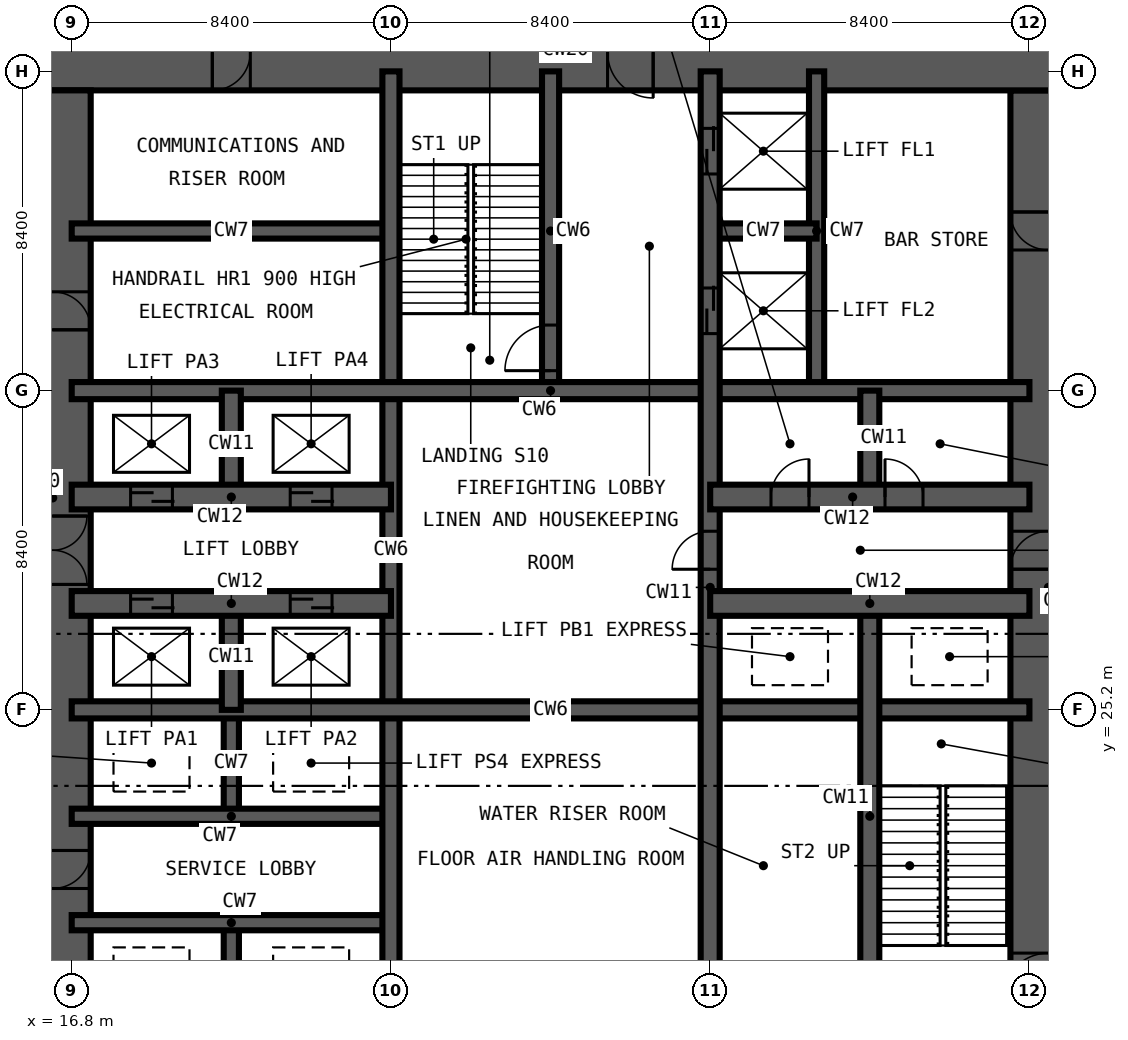
"""IFC4 building model, lengths in metres.
Left out: names, types, materials, properties, quantities, classifications, styles, units other than length and angle.
Written with IfcOpenShell. Run it as: python <this file> out.ifc"""

import sys

from ifc_helpers import new_model, si_unit, direction, frame, frame_2d, origin, place, context, subcontext, project, spatial, rectangle, extrude, element, fill, save


model = new_model("IFC4")
c1 = context("Model", 3, precision=1e-05, world=origin(), true_north=direction((0.0, 1.0)))
c2 = subcontext(c1, "Body", "Model", "MODEL_VIEW")
j1 = project(units=[si_unit("LENGTHUNIT", "METRE"), si_unit("PLANEANGLEUNIT", "RADIAN")], contexts=[c1])
p1 = place(None, origin())
s1 = spatial("IfcSite", under=j1, at=p1, CompositionType="ELEMENT")
p2 = place(p1, origin())
s2 = spatial("IfcBuilding", under=s1, at=p2, CompositionType="ELEMENT")
p3 = place(p2, frame((0.0, 0.0, 17.0)))
s3 = spatial("IfcBuildingStorey", under=s2, at=p3, CompositionType="ELEMENT", Elevation=17.0)
p4 = place(p3, frame((42.5, 17.3, -0.3), z_axis=(0.0, 0.0, 1.0), x_axis=(0.0, 1.0, 0.0)))
e1 = element("IfcWall", 1, at=p4, inside=s3, PredefinedType="SHEAR", context=c2, shape_type="SweptSolid", body=[
    extrude(rectangle(XDim=24.2, YDim=2.0, at=frame_2d((12.1, 0.0))), origin(), (0.0, 0.0, 1.0), 4.95),
])
p5 = place(p4, frame((0.3, 0.0, 0.3)))
e2 = element("IfcOpeningElement", 2, at=p5, cuts=e1, PredefinedType="OPENING", context=c2, shape_type="SweptSolid", body=[
    extrude(rectangle(XDim=1.2, YDim=2.2, at=frame_2d((0.6, 1.1))), frame((0.0, 1.01, 0.0), z_axis=(0.0, -1.0, 0.0), x_axis=(1.0, 0.0, 0.0)), (0.0, 0.0, 1.0), 2.02),
])
p6 = place(p4, frame((11.6, 0.0, 0.3)))
e3 = element("IfcOpeningElement", 3, at=p6, cuts=e1, PredefinedType="OPENING", context=c2, shape_type="SweptSolid", body=[
    extrude(rectangle(XDim=1.0, YDim=2.1, at=frame_2d((0.5, 1.05))), frame((0.0, 1.01, 0.0), z_axis=(0.0, -1.0, 0.0), x_axis=(1.0, 0.0, 0.0)), (0.0, 0.0, 1.0), 2.02),
])
p7 = place(p4, frame((20.0, 0.0, 0.3)))
e4 = element("IfcOpeningElement", 4, at=p7, cuts=e1, PredefinedType="OPENING", context=c2, shape_type="SweptSolid", body=[
    extrude(rectangle(XDim=1.0, YDim=2.1, at=frame_2d((0.5, 1.05))), frame((0.0, 1.01, 0.0), z_axis=(0.0, -1.0, 0.0), x_axis=(1.0, 0.0, 0.0)), (0.0, 0.0, 1.0), 2.02),
])
p8 = place(p3, frame((43.5, 42.5, -0.3), z_axis=(0.0, 0.0, 1.0), x_axis=(-1.0, 0.0, 0.0)))
e5 = element("IfcWall", 5, at=p8, inside=s3, PredefinedType="SHEAR", context=c2, shape_type="SweptSolid", body=[
    extrude(rectangle(XDim=28.2, YDim=2.0, at=frame_2d((14.1, 0.0))), origin(), (0.0, 0.0, 1.0), 4.95),
])
p9 = place(p8, frame((22.0, 0.0, 0.3)))
e6 = element("IfcOpeningElement", 6, at=p9, cuts=e5, PredefinedType="OPENING", context=c2, shape_type="SweptSolid", body=[
    extrude(rectangle(XDim=1.0, YDim=2.1, at=frame_2d((0.5, 1.05))), frame((0.0, 1.01, 0.0), z_axis=(0.0, -1.0, 0.0), x_axis=(1.0, 0.0, 0.0)), (0.0, 0.0, 1.0), 2.02),
])
p10 = place(p8, frame((11.4, 0.0, 0.3)))
e7 = element("IfcOpeningElement", 7, at=p10, cuts=e5, PredefinedType="OPENING", context=c2, shape_type="SweptSolid", body=[
    extrude(rectangle(XDim=1.2, YDim=2.2, at=frame_2d((0.6, 1.1))), frame((0.0, 1.01, 0.0), z_axis=(0.0, -1.0, 0.0), x_axis=(1.0, 0.0, 0.0)), (0.0, 0.0, 1.0), 2.02),
])
p11 = place(p3, frame((16.3, 41.5, -0.3), z_axis=(0.0, 0.0, 1.0), x_axis=(0.0, -1.0, 0.0)))
e8 = element("IfcWall", 8, at=p11, inside=s3, PredefinedType="SHEAR", context=c2, shape_type="SweptSolid", body=[
    extrude(rectangle(XDim=24.2, YDim=2.0, at=frame_2d((12.1, 0.0))), origin(), (0.0, 0.0, 1.0), 4.95),
])
p12 = place(p11, frame((11.2, 0.0, 0.3)))
e9 = element("IfcOpeningElement", 9, at=p12, cuts=e8, PredefinedType="OPENING", context=c2, shape_type="SweptSolid", body=[
    extrude(rectangle(XDim=1.8, YDim=2.2, at=frame_2d((0.9, 1.1))), frame((0.0, 1.01, 0.0), z_axis=(0.0, -1.0, 0.0), x_axis=(1.0, 0.0, 0.0)), (0.0, 0.0, 1.0), 2.02),
])
p13 = place(p11, frame((20.0, 0.0, 0.3)))
e10 = element("IfcOpeningElement", 10, at=p13, cuts=e8, PredefinedType="OPENING", context=c2, shape_type="SweptSolid", body=[
    extrude(rectangle(XDim=1.0, YDim=2.1, at=frame_2d((0.5, 1.05))), frame((0.0, 1.01, 0.0), z_axis=(0.0, -1.0, 0.0), x_axis=(1.0, 0.0, 0.0)), (0.0, 0.0, 1.0), 2.02),
])
p14 = place(p11, frame((5.3, 0.0, 0.3)))
e11 = element("IfcOpeningElement", 11, at=p14, cuts=e8, PredefinedType="OPENING", context=c2, shape_type="SweptSolid", body=[
    extrude(rectangle(XDim=1.0, YDim=2.1, at=frame_2d((0.5, 1.05))), frame((0.0, 1.01, 0.0), z_axis=(0.0, -1.0, 0.0), x_axis=(1.0, 0.0, 0.0)), (0.0, 0.0, 1.0), 2.02),
])
for number, where, z_axis, x_axis in (
    (12, (21.0, 16.8, -0.3), (0.0, 0.0, 1.0), (0.0, 1.0, 0.0)),
    (13, (21.0, 22.4, -0.3), (0.0, 0.0, 1.0), (0.0, 1.0, 0.0)),
):
    element("IfcWall", number, at=place(p3, frame(where, z_axis=z_axis, x_axis=x_axis)), inside=s3, PredefinedType="SHEAR", context=c2, shape_type="SweptSolid", body=[
        extrude(rectangle(XDim=2.8, YDim=0.4, at=frame_2d((1.4, 0.0))), origin(), (0.0, 0.0, 1.0), 4.95),
    ])
for number, where, z_axis, x_axis in (
    (14, (36.4, 33.6, -0.3), (0.0, 0.0, 1.0), (0.0, 1.0, 0.0)),
    (15, (16.8, 19.6, -0.3), (0.0, 0.0, 1.0), (1.0, 0.0, 0.0)),
    (16, (16.8, 22.4, -0.3), (0.0, 0.0, 1.0), (1.0, 0.0, 0.0)),
    (17, (16.8, 37.8, -0.3), (0.0, 0.0, 1.0), (1.0, 0.0, 0.0)),
):
    element("IfcWall", number, at=place(p3, frame(where, z_axis=z_axis, x_axis=x_axis)), inside=s3, PredefinedType="SHEAR", context=c2, shape_type="SweptSolid", body=[
        extrude(rectangle(XDim=8.4, YDim=0.4, at=frame_2d((4.2, 0.0))), origin(), (0.0, 0.0, 1.0), 4.95),
    ])
p15 = place(p3, frame((33.6, 37.8, -0.3), z_axis=(0.0, 0.0, 1.0), x_axis=(1.0, 0.0, 0.0)))
e18 = element("IfcWall", 18, at=p15, inside=s3, PredefinedType="SHEAR", context=c2, shape_type="SweptSolid", body=[
    extrude(rectangle(XDim=2.8, YDim=0.4, at=frame_2d((1.4, 0.0))), origin(), (0.0, 0.0, 1.0), 4.95),
])
p16 = place(p3, frame((25.2, 16.8, -0.3), z_axis=(0.0, 0.0, 1.0), x_axis=(0.0, 1.0, 0.0)))
e19 = element("IfcWall", 19, at=p16, inside=s3, PredefinedType="SHEAR", context=c2, shape_type="SweptSolid", body=[
    extrude(rectangle(XDim=25.2, YDim=0.45, at=frame_2d((12.6, 0.0))), origin(), (0.0, 0.0, 1.0), 4.95),
])
p17 = place(p3, frame((29.4, 33.6, -0.3), z_axis=(0.0, 0.0, 1.0), x_axis=(0.0, 1.0, 0.0)))
e20 = element("IfcWall", 20, at=p17, inside=s3, PredefinedType="SHEAR", context=c2, shape_type="SweptSolid", body=[
    extrude(rectangle(XDim=8.4, YDim=0.45, at=frame_2d((4.2, 0.0))), origin(), (0.0, 0.0, 1.0), 4.95),
])
p18 = place(p17, frame((0.525, 0.0, 0.3)))
e21 = element("IfcOpeningElement", 21, at=p18, cuts=e20, PredefinedType="OPENING", context=c2, shape_type="SweptSolid", body=[
    extrude(rectangle(XDim=1.2, YDim=2.2, at=frame_2d((0.6, 1.1))), frame((0.0, 0.235, 0.0), z_axis=(0.0, -1.0, 0.0), x_axis=(1.0, 0.0, 0.0)), (0.0, 0.0, 1.0), 0.47),
])
for number, where, z_axis, x_axis in (
    (22, (16.8, 25.2, -0.3), (0.0, 0.0, 1.0), (1.0, 0.0, 0.0)),
    (23, (16.8, 33.6, -0.3), (0.0, 0.0, 1.0), (1.0, 0.0, 0.0)),
):
    element("IfcWall", number, at=place(p3, frame(where, z_axis=z_axis, x_axis=x_axis)), inside=s3, PredefinedType="SHEAR", context=c2, shape_type="SweptSolid", body=[
        extrude(rectangle(XDim=25.2, YDim=0.45, at=frame_2d((12.6, 0.0))), origin(), (0.0, 0.0, 1.0), 4.95),
    ])
for number, where, z_axis, x_axis in (
    (24, (21.0, 25.2, -0.3), (0.0, 0.0, 1.0), (0.0, 1.0, 0.0)),
    (25, (21.0, 30.8, -0.3), (0.0, 0.0, 1.0), (0.0, 1.0, 0.0)),
):
    element("IfcWall", number, at=place(p3, frame(where, z_axis=z_axis, x_axis=x_axis)), inside=s3, PredefinedType="SHEAR", context=c2, shape_type="SweptSolid", body=[
        extrude(rectangle(XDim=2.8, YDim=0.5, at=frame_2d((1.4, 0.0))), origin(), (0.0, 0.0, 1.0), 4.95),
    ])
p19 = place(p3, frame((33.6, 16.8, -0.3), z_axis=(0.0, 0.0, 1.0), x_axis=(0.0, 1.0, 0.0)))
e26 = element("IfcWall", 26, at=p19, inside=s3, PredefinedType="SHEAR", context=c2, shape_type="SweptSolid", body=[
    extrude(rectangle(XDim=25.2, YDim=0.5, at=frame_2d((12.6, 0.0))), origin(), (0.0, 0.0, 1.0), 4.95),
])
p20 = place(p19, frame((22.5, 0.0, 0.3)))
e27 = element("IfcOpeningElement", 27, at=p20, cuts=e26, PredefinedType="OPENING", context=c2, shape_type="SweptSolid", body=[
    extrude(rectangle(XDim=1.2, YDim=2.2, at=frame_2d((0.6, 1.1))), frame((0.0, 0.26, 0.0), z_axis=(0.0, -1.0, 0.0), x_axis=(1.0, 0.0, 0.0)), (0.0, 0.0, 1.0), 0.52),
])
p21 = place(p19, frame((18.3, 0.0, 0.3)))
e28 = element("IfcOpeningElement", 28, at=p21, cuts=e26, PredefinedType="OPENING", context=c2, shape_type="SweptSolid", body=[
    extrude(rectangle(XDim=1.2, YDim=2.2, at=frame_2d((0.6, 1.1))), frame((0.0, 0.26, 0.0), z_axis=(0.0, -1.0, 0.0), x_axis=(1.0, 0.0, 0.0)), (0.0, 0.0, 1.0), 0.52),
])
p22 = place(p19, frame((12.1, 0.0, 0.3)))
e29 = element("IfcOpeningElement", 29, at=p22, cuts=e26, PredefinedType="OPENING", context=c2, shape_type="SweptSolid", body=[
    extrude(rectangle(XDim=1.0, YDim=2.1, at=frame_2d((0.5, 1.05))), frame((0.0, 0.26, 0.0), z_axis=(0.0, -1.0, 0.0), x_axis=(1.0, 0.0, 0.0)), (0.0, 0.0, 1.0), 0.52),
])
p23 = place(p3, frame((37.8, 16.8, -0.3), z_axis=(0.0, 0.0, 1.0), x_axis=(0.0, 1.0, 0.0)))
e30 = element("IfcWall", 30, at=p23, inside=s3, PredefinedType="SHEAR", context=c2, shape_type="SweptSolid", body=[
    extrude(rectangle(XDim=11.2, YDim=0.5, at=frame_2d((5.6, 0.0))), origin(), (0.0, 0.0, 1.0), 4.95),
])
p24 = place(p3, frame((37.8, 30.8, -0.3), z_axis=(0.0, 0.0, 1.0), x_axis=(0.0, 1.0, 0.0)))
e31 = element("IfcWall", 31, at=p24, inside=s3, PredefinedType="SHEAR", context=c2, shape_type="SweptSolid", body=[
    extrude(rectangle(XDim=2.8, YDim=0.5, at=frame_2d((1.4, 0.0))), origin(), (0.0, 0.0, 1.0), 4.95),
])
p25 = place(p3, frame((16.8, 28.0, -0.3), z_axis=(0.0, 0.0, 1.0), x_axis=(1.0, 0.0, 0.0)))
e32 = element("IfcWall", 32, at=p25, inside=s3, PredefinedType="SHEAR", context=c2, shape_type="SweptSolid", body=[
    extrude(rectangle(XDim=8.4, YDim=0.65, at=frame_2d((4.2, 0.0))), origin(), (0.0, 0.0, 1.0), 4.95),
])
p26 = place(p25, frame((1.55, 0.0, 0.3)))
e33 = element("IfcOpeningElement", 33, at=p26, cuts=e32, PredefinedType="OPENING", context=c2, shape_type="SweptSolid", body=[
    extrude(rectangle(XDim=1.1, YDim=2.2, at=frame_2d((0.55, 1.1))), frame((0.0, 0.335, 0.0), z_axis=(0.0, -1.0, 0.0), x_axis=(1.0, 0.0, 0.0)), (0.0, 0.0, 1.0), 0.67),
])
p27 = place(p25, frame((5.75, 0.0, 0.3)))
e34 = element("IfcOpeningElement", 34, at=p27, cuts=e32, PredefinedType="OPENING", context=c2, shape_type="SweptSolid", body=[
    extrude(rectangle(XDim=1.1, YDim=2.2, at=frame_2d((0.55, 1.1))), frame((0.0, 0.335, 0.0), z_axis=(0.0, -1.0, 0.0), x_axis=(1.0, 0.0, 0.0)), (0.0, 0.0, 1.0), 0.67),
])
p28 = place(p3, frame((33.6, 28.0, -0.3), z_axis=(0.0, 0.0, 1.0), x_axis=(1.0, 0.0, 0.0)))
e35 = element("IfcWall", 35, at=p28, inside=s3, PredefinedType="SHEAR", context=c2, shape_type="SweptSolid", body=[
    extrude(rectangle(XDim=8.4, YDim=0.65, at=frame_2d((4.2, 0.0))), origin(), (0.0, 0.0, 1.0), 4.95),
])
p29 = place(p3, frame((16.8, 30.8, -0.3), z_axis=(0.0, 0.0, 1.0), x_axis=(1.0, 0.0, 0.0)))
e36 = element("IfcWall", 36, at=p29, inside=s3, PredefinedType="SHEAR", context=c2, shape_type="SweptSolid", body=[
    extrude(rectangle(XDim=8.4, YDim=0.65, at=frame_2d((4.2, 0.0))), origin(), (0.0, 0.0, 1.0), 4.95),
])
p30 = place(p29, frame((1.55, 0.0, 0.3)))
e37 = element("IfcOpeningElement", 37, at=p30, cuts=e36, PredefinedType="OPENING", context=c2, shape_type="SweptSolid", body=[
    extrude(rectangle(XDim=1.1, YDim=2.2, at=frame_2d((0.55, 1.1))), frame((0.0, 0.335, 0.0), z_axis=(0.0, -1.0, 0.0), x_axis=(1.0, 0.0, 0.0)), (0.0, 0.0, 1.0), 0.67),
])
p31 = place(p29, frame((5.75, 0.0, 0.3)))
e38 = element("IfcOpeningElement", 38, at=p31, cuts=e36, PredefinedType="OPENING", context=c2, shape_type="SweptSolid", body=[
    extrude(rectangle(XDim=1.1, YDim=2.2, at=frame_2d((0.55, 1.1))), frame((0.0, 0.335, 0.0), z_axis=(0.0, -1.0, 0.0), x_axis=(1.0, 0.0, 0.0)), (0.0, 0.0, 1.0), 0.67),
])
p32 = place(p3, frame((33.6, 30.8, -0.3), z_axis=(0.0, 0.0, 1.0), x_axis=(1.0, 0.0, 0.0)))
e39 = element("IfcWall", 39, at=p32, inside=s3, PredefinedType="SHEAR", context=c2, shape_type="SweptSolid", body=[
    extrude(rectangle(XDim=8.4, YDim=0.65, at=frame_2d((4.2, 0.0))), origin(), (0.0, 0.0, 1.0), 4.95),
])
p33 = place(p32, frame((1.6, 0.0, 0.3)))
e40 = element("IfcOpeningElement", 40, at=p33, cuts=e39, PredefinedType="OPENING", context=c2, shape_type="SweptSolid", body=[
    extrude(rectangle(XDim=1.0, YDim=2.1, at=frame_2d((0.5, 1.05))), frame((0.0, 0.335, 0.0), z_axis=(0.0, -1.0, 0.0), x_axis=(1.0, 0.0, 0.0)), (0.0, 0.0, 1.0), 0.67),
])
p34 = place(p32, frame((4.6, 0.0, 0.3)))
e41 = element("IfcOpeningElement", 41, at=p34, cuts=e39, PredefinedType="OPENING", context=c2, shape_type="SweptSolid", body=[
    extrude(rectangle(XDim=1.0, YDim=2.1, at=frame_2d((0.5, 1.05))), frame((0.0, 0.335, 0.0), z_axis=(0.0, -1.0, 0.0), x_axis=(1.0, 0.0, 0.0)), (0.0, 0.0, 1.0), 0.67),
])
p35 = place(p18, origin())
e42 = element("IfcDoor", 42, at=p35, inside=s3, OperationType="SINGLE_SWING_LEFT", PredefinedType="DOOR", context=c2, shape_type="SweptSolid", body=[
    extrude(rectangle(XDim=1.2, YDim=2.2, at=frame_2d((0.6, 1.1))), frame((0.0, 0.025, 0.0), z_axis=(0.0, -1.0, 0.0), x_axis=(1.0, 0.0, 0.0)), (0.0, 0.0, 1.0), 0.05),
])
fill(e21, e42)
p36 = place(p5, origin())
e43 = element("IfcDoor", 43, at=p36, inside=s3, OperationType="SINGLE_SWING_LEFT", PredefinedType="DOOR", context=c2, shape_type="SweptSolid", body=[
    extrude(rectangle(XDim=1.2, YDim=2.2, at=frame_2d((0.6, 1.1))), frame((0.0, 0.025, 0.0), z_axis=(0.0, -1.0, 0.0), x_axis=(1.0, 0.0, 0.0)), (0.0, 0.0, 1.0), 0.05),
])
fill(e2, e43)
p37 = place(p26, origin())
e44 = element("IfcDoor", 44, at=p37, inside=s3, OperationType="DOUBLE_DOOR_SLIDING", PredefinedType="DOOR", context=c2, shape_type="SweptSolid", body=[
    extrude(rectangle(XDim=1.1, YDim=2.2, at=frame_2d((0.55, 1.1))), frame((0.0, 0.025, 0.0), z_axis=(0.0, -1.0, 0.0), x_axis=(1.0, 0.0, 0.0)), (0.0, 0.0, 1.0), 0.05),
])
fill(e33, e44)
p38 = place(p27, origin())
e45 = element("IfcDoor", 45, at=p38, inside=s3, OperationType="DOUBLE_DOOR_SLIDING", PredefinedType="DOOR", context=c2, shape_type="SweptSolid", body=[
    extrude(rectangle(XDim=1.1, YDim=2.2, at=frame_2d((0.55, 1.1))), frame((0.0, 0.025, 0.0), z_axis=(0.0, -1.0, 0.0), x_axis=(1.0, 0.0, 0.0)), (0.0, 0.0, 1.0), 0.05),
])
fill(e34, e45)
p39 = place(p30, origin())
e46 = element("IfcDoor", 46, at=p39, inside=s3, OperationType="DOUBLE_DOOR_SLIDING", PredefinedType="DOOR", context=c2, shape_type="SweptSolid", body=[
    extrude(rectangle(XDim=1.1, YDim=2.2, at=frame_2d((0.55, 1.1))), frame((0.0, 0.025, 0.0), z_axis=(0.0, -1.0, 0.0), x_axis=(1.0, 0.0, 0.0)), (0.0, 0.0, 1.0), 0.05),
])
fill(e37, e46)
p40 = place(p31, origin())
e47 = element("IfcDoor", 47, at=p40, inside=s3, OperationType="DOUBLE_DOOR_SLIDING", PredefinedType="DOOR", context=c2, shape_type="SweptSolid", body=[
    extrude(rectangle(XDim=1.1, YDim=2.2, at=frame_2d((0.55, 1.1))), frame((0.0, 0.025, 0.0), z_axis=(0.0, -1.0, 0.0), x_axis=(1.0, 0.0, 0.0)), (0.0, 0.0, 1.0), 0.05),
])
fill(e38, e47)
p41 = place(p20, origin())
e48 = element("IfcDoor", 48, at=p41, inside=s3, OperationType="DOUBLE_DOOR_SLIDING", PredefinedType="DOOR", context=c2, shape_type="SweptSolid", body=[
    extrude(rectangle(XDim=1.2, YDim=2.2, at=frame_2d((0.6, 1.1))), frame((0.0, 0.025, 0.0), z_axis=(0.0, -1.0, 0.0), x_axis=(1.0, 0.0, 0.0)), (0.0, 0.0, 1.0), 0.05),
])
fill(e27, e48)
p42 = place(p21, origin())
e49 = element("IfcDoor", 49, at=p42, inside=s3, OperationType="DOUBLE_DOOR_SLIDING", PredefinedType="DOOR", context=c2, shape_type="SweptSolid", body=[
    extrude(rectangle(XDim=1.2, YDim=2.2, at=frame_2d((0.6, 1.1))), frame((0.0, 0.025, 0.0), z_axis=(0.0, -1.0, 0.0), x_axis=(1.0, 0.0, 0.0)), (0.0, 0.0, 1.0), 0.05),
])
fill(e28, e49)
p43 = place(p12, origin())
e50 = element("IfcDoor", 50, at=p43, inside=s3, OperationType="DOUBLE_DOOR_DOUBLE_SWING", PredefinedType="DOOR", context=c2, shape_type="SweptSolid", body=[
    extrude(rectangle(XDim=1.8, YDim=2.2, at=frame_2d((0.9, 1.1))), frame((0.0, 0.025, 0.0), z_axis=(0.0, -1.0, 0.0), x_axis=(1.0, 0.0, 0.0)), (0.0, 0.0, 1.0), 0.05),
])
fill(e9, e50)
p44 = place(p13, origin())
e51 = element("IfcDoor", 51, at=p44, inside=s3, OperationType="SINGLE_SWING_LEFT", PredefinedType="DOOR", context=c2, shape_type="SweptSolid", body=[
    extrude(rectangle(XDim=1.0, YDim=2.1, at=frame_2d((0.5, 1.05))), frame((0.0, 0.025, 0.0), z_axis=(0.0, -1.0, 0.0), x_axis=(1.0, 0.0, 0.0)), (0.0, 0.0, 1.0), 0.05),
])
fill(e10, e51)
p45 = place(p14, origin())
e52 = element("IfcDoor", 52, at=p45, inside=s3, OperationType="SINGLE_SWING_RIGHT", PredefinedType="DOOR", context=c2, shape_type="SweptSolid", body=[
    extrude(rectangle(XDim=1.0, YDim=2.1, at=frame_2d((0.5, 1.05))), frame((0.0, 0.025, 0.0), z_axis=(0.0, -1.0, 0.0), x_axis=(1.0, 0.0, 0.0)), (0.0, 0.0, 1.0), 0.05),
])
fill(e11, e52)
p46 = place(p9, origin())
e53 = element("IfcDoor", 53, at=p46, inside=s3, OperationType="SINGLE_SWING_RIGHT", PredefinedType="DOOR", context=c2, shape_type="SweptSolid", body=[
    extrude(rectangle(XDim=1.0, YDim=2.1, at=frame_2d((0.5, 1.05))), frame((0.0, 0.025, 0.0), z_axis=(0.0, -1.0, 0.0), x_axis=(1.0, 0.0, 0.0)), (0.0, 0.0, 1.0), 0.05),
])
fill(e6, e53)
p47 = place(p22, origin())
e54 = element("IfcDoor", 54, at=p47, inside=s3, OperationType="SINGLE_SWING_LEFT", PredefinedType="DOOR", context=c2, shape_type="SweptSolid", body=[
    extrude(rectangle(XDim=1.0, YDim=2.1, at=frame_2d((0.5, 1.05))), frame((0.0, 0.025, 0.0), z_axis=(0.0, -1.0, 0.0), x_axis=(1.0, 0.0, 0.0)), (0.0, 0.0, 1.0), 0.05),
])
fill(e29, e54)
p48 = place(p33, origin())
e55 = element("IfcDoor", 55, at=p48, inside=s3, OperationType="SINGLE_SWING_RIGHT", PredefinedType="DOOR", context=c2, shape_type="SweptSolid", body=[
    extrude(rectangle(XDim=1.0, YDim=2.1, at=frame_2d((0.5, 1.05))), frame((0.0, 0.025, 0.0), z_axis=(0.0, -1.0, 0.0), x_axis=(1.0, 0.0, 0.0)), (0.0, 0.0, 1.0), 0.05),
])
fill(e40, e55)
p49 = place(p34, origin())
e56 = element("IfcDoor", 56, at=p49, inside=s3, OperationType="SINGLE_SWING_LEFT", PredefinedType="DOOR", context=c2, shape_type="SweptSolid", body=[
    extrude(rectangle(XDim=1.0, YDim=2.1, at=frame_2d((0.5, 1.05))), frame((0.0, 0.025, 0.0), z_axis=(0.0, -1.0, 0.0), x_axis=(1.0, 0.0, 0.0)), (0.0, 0.0, 1.0), 0.05),
])
fill(e41, e56)
p50 = place(p6, origin())
e57 = element("IfcDoor", 57, at=p50, inside=s3, OperationType="SINGLE_SWING_LEFT", PredefinedType="DOOR", context=c2, shape_type="SweptSolid", body=[
    extrude(rectangle(XDim=1.0, YDim=2.1, at=frame_2d((0.5, 1.05))), frame((0.0, 0.025, 0.0), z_axis=(0.0, -1.0, 0.0), x_axis=(1.0, 0.0, 0.0)), (0.0, 0.0, 1.0), 0.05),
])
fill(e3, e57)
p51 = place(p10, origin())
e58 = element("IfcDoor", 58, at=p51, inside=s3, OperationType="SINGLE_SWING_LEFT", PredefinedType="DOOR", context=c2, shape_type="SweptSolid", body=[
    extrude(rectangle(XDim=1.2, YDim=2.2, at=frame_2d((0.6, 1.1))), frame((0.0, 0.025, 0.0), z_axis=(0.0, -1.0, 0.0), x_axis=(1.0, 0.0, 0.0)), (0.0, 0.0, 1.0), 0.05),
])
fill(e7, e58)
p52 = place(p7, origin())
e59 = element("IfcDoor", 59, at=p52, inside=s3, OperationType="SINGLE_SWING_RIGHT", PredefinedType="DOOR", context=c2, shape_type="SweptSolid", body=[
    extrude(rectangle(XDim=1.0, YDim=2.1, at=frame_2d((0.5, 1.05))), frame((0.0, 0.025, 0.0), z_axis=(0.0, -1.0, 0.0), x_axis=(1.0, 0.0, 0.0)), (0.0, 0.0, 1.0), 0.05),
])
fill(e4, e59)
save(model, sys.argv[1])
